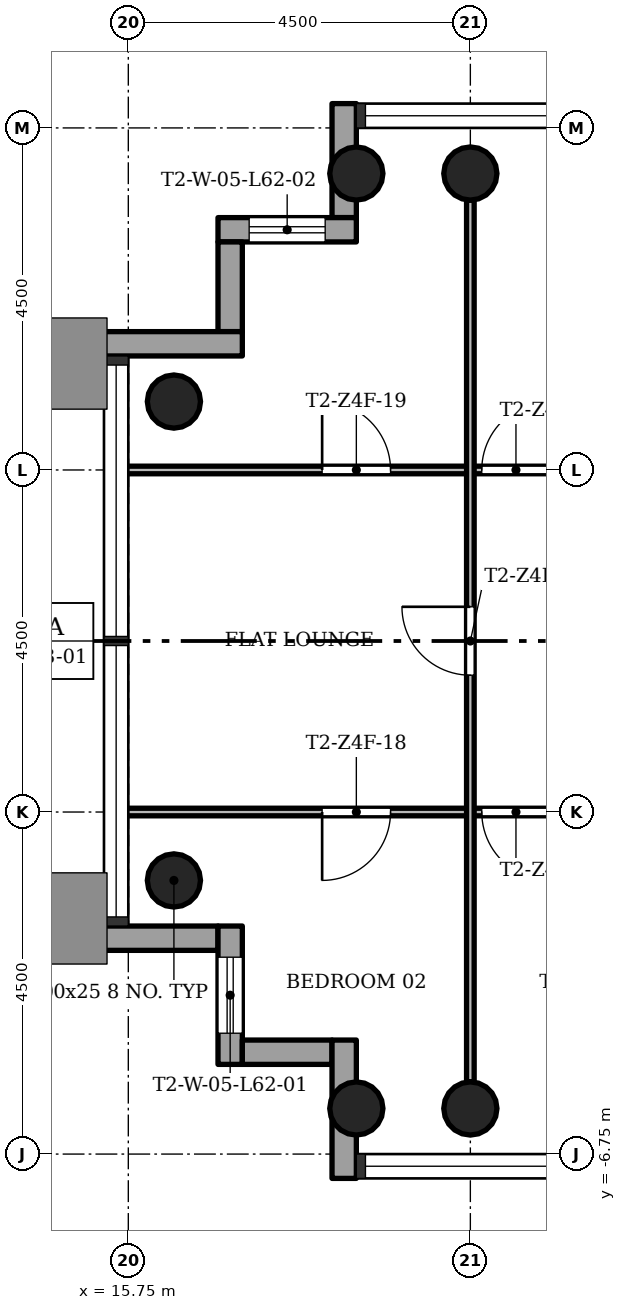
"""IFC4 building model, lengths in metres.
Left out: names, types, materials, properties, quantities, classifications, styles, units other than length and angle.
Written with IfcOpenShell. Run it as: python <this file> out.ifc"""

import sys

from ifc_helpers import new_model, si_unit, direction, frame, frame_2d, origin, origin_2d, place, context, subcontext, project, spatial, rectangle, hollow_circle, extrude, element, fill, save


model = new_model("IFC4")
c1 = context("Model", 3, precision=1e-05, world=origin(), true_north=direction((0.0, 1.0)))
c2 = subcontext(c1, "Body", "Model", "MODEL_VIEW")
j1 = project(units=[si_unit("LENGTHUNIT", "METRE"), si_unit("PLANEANGLEUNIT", "RADIAN")], contexts=[c1])
p1 = place(None, origin())
s1 = spatial("IfcSite", under=j1, at=p1, CompositionType="ELEMENT")
p2 = place(p1, origin())
s2 = spatial("IfcBuilding", under=s1, at=p2, CompositionType="ELEMENT")
p3 = place(p2, frame((0.0, 0.0, 223.2)))
s3 = spatial("IfcBuildingStorey", under=s2, at=p3, CompositionType="ELEMENT", Elevation=223.2)
for number, where, z_axis, x_axis in (
    (1, (20.25, 6.15, 0.0), (0.0, 0.0, 1.0), (1.0, 0.0, 0.0)),
    (2, (20.25, -6.15, 0.0), (0.0, 0.0, 1.0), (1.0, 0.0, 0.0)),
    (3, (18.75, 6.15, 0.0), (0.0, 0.0, 1.0), (1.0, 0.0, 0.0)),
    (4, (18.75, -6.15, 0.0), (0.0, 0.0, 1.0), (1.0, 0.0, 0.0)),
    (5, (16.35, 3.15, 0.0), (0.0, 0.0, 1.0), (1.0, 0.0, 0.0)),
    (6, (16.35, -3.15, 0.0), (0.0, 0.0, 1.0), (1.0, 0.0, 0.0)),
):
    element("IfcColumn", number, at=place(p3, frame(where, z_axis=z_axis, x_axis=x_axis)), inside=s3, PredefinedType="COLUMN", context=c2, shape_type="SweptSolid", body=[
        extrude(hollow_circle(Radius=0.35, WallThickness=0.025, at=origin_2d()), origin(), (0.0, 0.0, 1.0), 3.4),
    ])
p4 = place(p3, frame((18.59, 7.07, -0.3), z_axis=(0.0, 0.0, 1.0), x_axis=(0.0, -1.0, 0.0)))
e7 = element("IfcWall", 7, at=p4, inside=s3, PredefinedType="STANDARD", context=c2, shape_type="SweptSolid", body=[
    extrude(rectangle(XDim=1.5, YDim=0.32, at=frame_2d((0.75, 0.0))), origin(), (0.0, 0.0, 1.0), 3.4),
])
p5 = place(p3, frame((18.75, 5.41, -0.3), z_axis=(0.0, 0.0, 1.0), x_axis=(-1.0, 0.0, 0.0)))
e8 = element("IfcWall", 8, at=p5, inside=s3, PredefinedType="STANDARD", context=c2, shape_type="SweptSolid", body=[
    extrude(rectangle(XDim=1.82, YDim=0.32, at=frame_2d((0.91, 0.0))), origin(), (0.0, 0.0, 1.0), 3.4),
])
p6 = place(p5, frame((0.41, 0.0, 1.2)))
e9 = element("IfcOpeningElement", 9, at=p6, cuts=e8, PredefinedType="OPENING", context=c2, shape_type="SweptSolid", body=[
    extrude(rectangle(XDim=1.0, YDim=1.5, at=frame_2d((0.5, 0.75))), frame((0.0, 0.17, 0.0), z_axis=(0.0, -1.0, 0.0), x_axis=(1.0, 0.0, 0.0)), (0.0, 0.0, 1.0), 0.34),
])
p7 = place(p3, frame((17.09, 5.25, -0.3), z_axis=(0.0, 0.0, 1.0), x_axis=(0.0, -1.0, 0.0)))
e10 = element("IfcWall", 10, at=p7, inside=s3, PredefinedType="STANDARD", context=c2, shape_type="SweptSolid", body=[
    extrude(rectangle(XDim=1.18, YDim=0.32, at=frame_2d((0.59, 0.0))), origin(), (0.0, 0.0, 1.0), 3.4),
])
p8 = place(p3, frame((17.25, 3.91, -0.3), z_axis=(0.0, 0.0, 1.0), x_axis=(-1.0, 0.0, 0.0)))
e11 = element("IfcWall", 11, at=p8, inside=s3, PredefinedType="STANDARD", context=c2, shape_type="SweptSolid", body=[
    extrude(rectangle(XDim=1.82, YDim=0.32, at=frame_2d((0.91, 0.0))), origin(), (0.0, 0.0, 1.0), 3.4),
])
p9 = place(p3, frame((15.43, -3.91, -0.3), z_axis=(0.0, 0.0, 1.0), x_axis=(1.0, 0.0, 0.0)))
e12 = element("IfcWall", 12, at=p9, inside=s3, PredefinedType="STANDARD", context=c2, shape_type="SweptSolid", body=[
    extrude(rectangle(XDim=1.5, YDim=0.32, at=frame_2d((0.75, 0.0))), origin(), (0.0, 0.0, 1.0), 3.4),
])
p10 = place(p3, frame((17.09, -3.75, -0.3), z_axis=(0.0, 0.0, 1.0), x_axis=(0.0, -1.0, 0.0)))
e13 = element("IfcWall", 13, at=p10, inside=s3, PredefinedType="STANDARD", context=c2, shape_type="SweptSolid", body=[
    extrude(rectangle(XDim=1.82, YDim=0.32, at=frame_2d((0.91, 0.0))), origin(), (0.0, 0.0, 1.0), 3.4),
])
p11 = place(p10, frame((0.41, 0.0, 1.2)))
e14 = element("IfcOpeningElement", 14, at=p11, cuts=e13, PredefinedType="OPENING", context=c2, shape_type="SweptSolid", body=[
    extrude(rectangle(XDim=1.0, YDim=1.5, at=frame_2d((0.5, 0.75))), frame((0.0, 0.17, 0.0), z_axis=(0.0, -1.0, 0.0), x_axis=(1.0, 0.0, 0.0)), (0.0, 0.0, 1.0), 0.34),
])
p12 = place(p3, frame((17.25, -5.41, -0.3), z_axis=(0.0, 0.0, 1.0), x_axis=(1.0, 0.0, 0.0)))
e15 = element("IfcWall", 15, at=p12, inside=s3, PredefinedType="STANDARD", context=c2, shape_type="SweptSolid", body=[
    extrude(rectangle(XDim=1.18, YDim=0.32, at=frame_2d((0.59, 0.0))), origin(), (0.0, 0.0, 1.0), 3.4),
])
p13 = place(p3, frame((18.59, -5.25, -0.3), z_axis=(0.0, 0.0, 1.0), x_axis=(0.0, -1.0, 0.0)))
e16 = element("IfcWall", 16, at=p13, inside=s3, PredefinedType="STANDARD", context=c2, shape_type="SweptSolid", body=[
    extrude(rectangle(XDim=1.82, YDim=0.32, at=frame_2d((0.91, 0.0))), origin(), (0.0, 0.0, 1.0), 3.4),
])
p14 = place(p3, frame((24.75, -2.25, 0.0), z_axis=(0.0, 0.0, 1.0), x_axis=(-1.0, 0.0, 0.0)))
e17 = element("IfcWall", 17, at=p14, inside=s3, PredefinedType="PARTITIONING", context=c2, shape_type="SweptSolid", body=[
    extrude(rectangle(XDim=9.1, YDim=0.1, at=frame_2d((4.55, 0.0))), origin(), (0.0, 0.0, 1.0), 3.0),
])
p15 = place(p14, frame((3.45, 0.0, 0.0)))
e18 = element("IfcOpeningElement", 18, at=p15, cuts=e17, PredefinedType="OPENING", context=c2, shape_type="SweptSolid", body=[
    extrude(rectangle(XDim=0.9, YDim=2.1, at=frame_2d((0.45, 1.05))), frame((0.0, 0.06, 0.0), z_axis=(0.0, -1.0, 0.0), x_axis=(1.0, 0.0, 0.0)), (0.0, 0.0, 1.0), 0.12),
])
p16 = place(p14, frame((5.55, 0.0, 0.0)))
e19 = element("IfcOpeningElement", 19, at=p16, cuts=e17, PredefinedType="OPENING", context=c2, shape_type="SweptSolid", body=[
    extrude(rectangle(XDim=0.9, YDim=2.1, at=frame_2d((0.45, 1.05))), frame((0.0, 0.06, 0.0), z_axis=(0.0, -1.0, 0.0), x_axis=(1.0, 0.0, 0.0)), (0.0, 0.0, 1.0), 0.12),
])
p17 = place(p3, frame((24.75, 2.25, 0.0), z_axis=(0.0, 0.0, 1.0), x_axis=(-1.0, 0.0, 0.0)))
e20 = element("IfcWall", 20, at=p17, inside=s3, PredefinedType="PARTITIONING", context=c2, shape_type="SweptSolid", body=[
    extrude(rectangle(XDim=9.1, YDim=0.1, at=frame_2d((4.55, 0.0))), origin(), (0.0, 0.0, 1.0), 3.0),
])
p18 = place(p17, frame((3.45, 0.0, 0.0)))
e21 = element("IfcOpeningElement", 21, at=p18, cuts=e20, PredefinedType="OPENING", context=c2, shape_type="SweptSolid", body=[
    extrude(rectangle(XDim=0.9, YDim=2.1, at=frame_2d((0.45, 1.05))), frame((0.0, 0.06, 0.0), z_axis=(0.0, -1.0, 0.0), x_axis=(1.0, 0.0, 0.0)), (0.0, 0.0, 1.0), 0.12),
])
p19 = place(p17, frame((5.55, 0.0, 0.0)))
e22 = element("IfcOpeningElement", 22, at=p19, cuts=e20, PredefinedType="OPENING", context=c2, shape_type="SweptSolid", body=[
    extrude(rectangle(XDim=0.9, YDim=2.1, at=frame_2d((0.45, 1.05))), frame((0.0, 0.06, 0.0), z_axis=(0.0, -1.0, 0.0), x_axis=(1.0, 0.0, 0.0)), (0.0, 0.0, 1.0), 0.12),
])
p20 = place(p3, frame((20.25, -5.8, 0.0), z_axis=(0.0, 0.0, 1.0), x_axis=(0.0, 1.0, 0.0)))
e23 = element("IfcWall", 23, at=p20, inside=s3, PredefinedType="PARTITIONING", context=c2, shape_type="SweptSolid", body=[
    extrude(rectangle(XDim=11.6, YDim=0.1, at=frame_2d((5.8, 0.0))), origin(), (0.0, 0.0, 1.0), 3.0),
])
p21 = place(p20, frame((5.35, 0.0, 0.0)))
e24 = element("IfcOpeningElement", 24, at=p21, cuts=e23, PredefinedType="OPENING", context=c2, shape_type="SweptSolid", body=[
    extrude(rectangle(XDim=0.9, YDim=2.1, at=frame_2d((0.45, 1.05))), frame((0.0, 0.06, 0.0), z_axis=(0.0, -1.0, 0.0), x_axis=(1.0, 0.0, 0.0)), (0.0, 0.0, 1.0), 0.12),
])
p22 = place(p15, origin())
e25 = element("IfcDoor", 25, at=p22, inside=s3, OperationType="SINGLE_SWING_RIGHT", PredefinedType="DOOR", context=c2, shape_type="SweptSolid", body=[
    extrude(rectangle(XDim=0.9, YDim=2.1, at=frame_2d((0.45, 1.05))), frame((0.0, 0.025, 0.0), z_axis=(0.0, -1.0, 0.0), x_axis=(1.0, 0.0, 0.0)), (0.0, 0.0, 1.0), 0.05),
])
fill(e18, e25)
p23 = place(p18, origin())
e26 = element("IfcDoor", 26, at=p23, inside=s3, OperationType="SINGLE_SWING_LEFT", PredefinedType="DOOR", context=c2, shape_type="SweptSolid", body=[
    extrude(rectangle(XDim=0.9, YDim=2.1, at=frame_2d((0.45, 1.05))), frame((0.0, 0.025, 0.0), z_axis=(0.0, -1.0, 0.0), x_axis=(1.0, 0.0, 0.0)), (0.0, 0.0, 1.0), 0.05),
])
fill(e21, e26)
p24 = place(p21, origin())
e27 = element("IfcDoor", 27, at=p24, inside=s3, OperationType="SINGLE_SWING_LEFT", PredefinedType="DOOR", context=c2, shape_type="SweptSolid", body=[
    extrude(rectangle(XDim=0.9, YDim=2.1, at=frame_2d((0.45, 1.05))), frame((0.0, 0.025, 0.0), z_axis=(0.0, -1.0, 0.0), x_axis=(1.0, 0.0, 0.0)), (0.0, 0.0, 1.0), 0.05),
])
fill(e24, e27)
p25 = place(p16, origin())
e28 = element("IfcDoor", 28, at=p25, inside=s3, OperationType="SINGLE_SWING_LEFT", PredefinedType="DOOR", context=c2, shape_type="SweptSolid", body=[
    extrude(rectangle(XDim=0.9, YDim=2.1, at=frame_2d((0.45, 1.05))), frame((0.0, 0.025, 0.0), z_axis=(0.0, -1.0, 0.0), x_axis=(1.0, 0.0, 0.0)), (0.0, 0.0, 1.0), 0.05),
])
fill(e19, e28)
p26 = place(p19, origin())
e29 = element("IfcDoor", 29, at=p26, inside=s3, OperationType="SINGLE_SWING_RIGHT", PredefinedType="DOOR", context=c2, shape_type="SweptSolid", body=[
    extrude(rectangle(XDim=0.9, YDim=2.1, at=frame_2d((0.45, 1.05))), frame((0.0, 0.025, 0.0), z_axis=(0.0, -1.0, 0.0), x_axis=(1.0, 0.0, 0.0)), (0.0, 0.0, 1.0), 0.05),
])
fill(e22, e29)
p27 = place(p11, origin())
e30 = element("IfcWindow", 30, at=p27, inside=s3, PartitioningType="SINGLE_PANEL", PredefinedType="WINDOW", context=c2, shape_type="SweptSolid", body=[
    extrude(rectangle(XDim=1.0, YDim=1.5, at=frame_2d((0.5, 0.75))), frame((0.0, 0.03, 0.0), z_axis=(0.0, -1.0, 0.0), x_axis=(1.0, 0.0, 0.0)), (0.0, 0.0, 1.0), 0.06),
])
fill(e14, e30)
p28 = place(p6, origin())
e31 = element("IfcWindow", 31, at=p28, inside=s3, PartitioningType="SINGLE_PANEL", PredefinedType="WINDOW", context=c2, shape_type="SweptSolid", body=[
    extrude(rectangle(XDim=1.0, YDim=1.5, at=frame_2d((0.5, 0.75))), frame((0.0, 0.03, 0.0), z_axis=(0.0, -1.0, 0.0), x_axis=(1.0, 0.0, 0.0)), (0.0, 0.0, 1.0), 0.06),
])
fill(e9, e31)
save(model, sys.argv[1])
